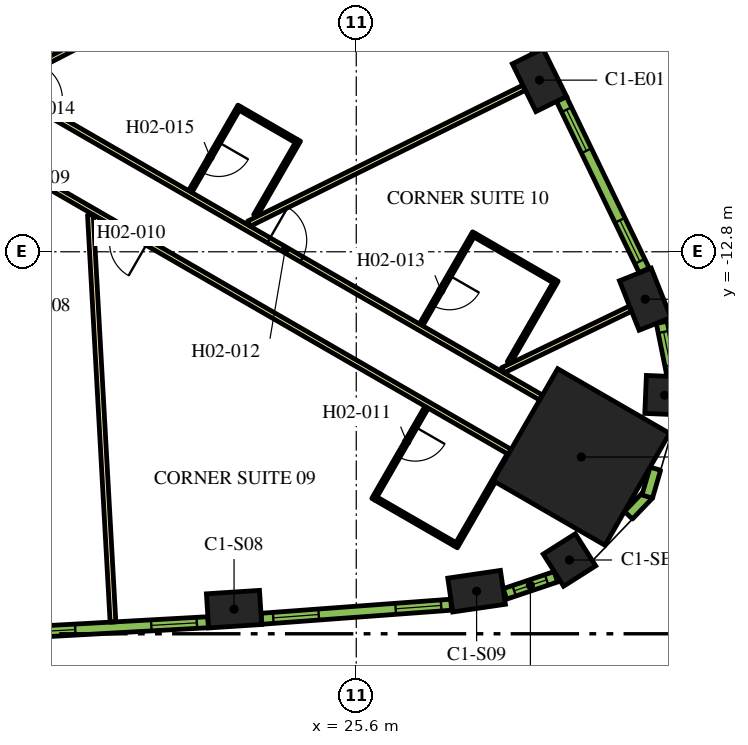
"""IFC4 building model, lengths in metres.
Left out: names, types, materials, properties, quantities, classifications, styles, units other than length and angle.
Written with IfcOpenShell. Run it as: python <this file> out.ifc"""

import sys

from ifc_helpers import new_model, si_unit, direction, frame, frame_2d, origin, origin_2d, place, context, subcontext, project, spatial, rectangle, extrude, element, fill, save


model = new_model("IFC4")
c1 = context("Model", 3, precision=1e-05, world=origin(), true_north=direction((0.0, 1.0)))
c2 = subcontext(c1, "Body", "Model", "MODEL_VIEW")
j1 = project(units=[si_unit("LENGTHUNIT", "METRE"), si_unit("PLANEANGLEUNIT", "RADIAN")], contexts=[c1])
p1 = place(None, origin())
s1 = spatial("IfcSite", under=j1, at=p1, CompositionType="ELEMENT")
p2 = place(p1, origin())
s2 = spatial("IfcBuilding", under=s1, at=p2, CompositionType="ELEMENT")
p3 = place(p2, frame((0.0, 0.0, 43.2)))
s3 = spatial("IfcBuildingStorey", under=s2, at=p3, CompositionType="ELEMENT", Elevation=43.2)
p4 = place(p3, frame((31.522, -18.199, 0.0), z_axis=(0.0, 0.0, 1.0), x_axis=(0.866025403784, -0.5, 0.0)))
e1 = element("IfcColumn", 1, at=p4, inside=s3, PredefinedType="COLUMN", context=c2, shape_type="SweptSolid", body=[
    extrude(rectangle(XDim=3.4, YDim=3.4, at=origin_2d()), origin(), (0.0, 0.0, 1.0), 3.9),
])
for number, where, z_axis, x_axis in (
    (2, (22.385, -22.204, 0.0), (0.0, 0.0, 1.0), (0.998, 0.065, 0.0)),
    (3, (28.767, -21.731, 0.0), (0.0, 0.0, 1.0), (0.989, 0.145, 0.0)),
):
    element("IfcColumn", number, at=place(p3, frame(where, z_axis=z_axis, x_axis=x_axis)), inside=s3, PredefinedType="COLUMN", context=c2, shape_type="SweptSolid", body=[
        extrude(rectangle(XDim=1.4, YDim=0.9, at=origin_2d()), origin(), (0.0, 0.0, 1.0), 3.9),
    ])
for number, where, z_axis, x_axis in (
    (4, (31.21, -20.91, 0.0), (0.0, 0.0, 1.0), (0.844, 0.536, 0.0)),
    (5, (33.713, -16.574, 0.0), (0.0, 0.0, 1.0), (0.042, 0.999, 0.0)),
):
    element("IfcColumn", number, at=place(p3, frame(where, z_axis=z_axis, x_axis=x_axis)), inside=s3, PredefinedType="COLUMN", context=c2, shape_type="SweptSolid", body=[
        extrude(rectangle(XDim=1.0, YDim=1.0, at=origin_2d()), origin(), (0.0, 0.0, 1.0), 3.9),
    ])
for number, where, z_axis, x_axis in (
    (6, (33.203, -14.047, 0.0), (0.0, 0.0, 1.0), (-0.369, 0.929, 0.0)),
    (7, (30.421, -8.284, 0.0), (0.0, 0.0, 1.0), (-0.443, 0.897, 0.0)),
):
    element("IfcColumn", number, at=place(p3, frame(where, z_axis=z_axis, x_axis=x_axis)), inside=s3, PredefinedType="COLUMN", context=c2, shape_type="SweptSolid", body=[
        extrude(rectangle(XDim=1.4, YDim=0.9, at=origin_2d()), origin(), (0.0, 0.0, 1.0), 3.9),
    ])
p5 = place(p3, frame((16.412, -8.523, 0.0), z_axis=(0.0, 0.0, 1.0), x_axis=(0.866022197818, -0.500005552856, 0.0)))
e8 = element("IfcWall", 8, at=p5, inside=s3, PredefinedType="PARTITIONING", context=c2, shape_type="SweptSolid", body=[
    extrude(rectangle(XDim=16.224, YDim=0.15, at=frame_2d((8.112, 0.0))), origin(), (0.0, 0.0, 1.0), 2.75),
])
p6 = place(p5, frame((7.949, 0.0, 0.0)))
e9 = element("IfcOpeningElement", 9, at=p6, cuts=e8, PredefinedType="OPENING", context=c2, shape_type="SweptSolid", body=[
    extrude(rectangle(XDim=1.0, YDim=2.1, at=frame_2d((0.5, 1.05))), frame((0.0, 0.085, 0.0), z_axis=(0.0, -1.0, 0.0), x_axis=(1.0, 0.0, 0.0)), (0.0, 0.0, 1.0), 0.17),
])
p7 = place(p5, frame((0.526, 0.0, 0.0)))
e10 = element("IfcOpeningElement", 10, at=p7, cuts=e8, PredefinedType="OPENING", context=c2, shape_type="SweptSolid", body=[
    extrude(rectangle(XDim=1.0, YDim=2.1, at=frame_2d((0.5, 1.05))), frame((0.0, 0.085, 0.0), z_axis=(0.0, -1.0, 0.0), x_axis=(1.0, 0.0, 0.0)), (0.0, 0.0, 1.0), 0.17),
])
p8 = place(p3, frame((19.081, -3.9, 0.0), z_axis=(0.0, 0.0, 1.0), x_axis=(-0.499974327079, -0.866040225545, 0.0)))
e11 = element("IfcWall", 11, at=p8, inside=s3, PredefinedType="PARTITIONING", context=c2, shape_type="SweptSolid", body=[
    extrude(rectangle(XDim=5.258, YDim=0.15, at=frame_2d((2.629, 0.0))), origin(), (0.0, 0.0, 1.0), 2.75),
])
p9 = place(p3, frame((29.638, -18.064, 0.0), z_axis=(0.0, 0.0, 1.0), x_axis=(-0.866026175601, 0.499998663172, 0.0)))
e12 = element("IfcWall", 12, at=p9, inside=s3, PredefinedType="PARTITIONING", context=c2, shape_type="SweptSolid", body=[
    extrude(rectangle(XDim=16.144, YDim=0.15, at=frame_2d((8.072, 0.0))), origin(), (0.0, 0.0, 1.0), 2.75),
])
p10 = place(p9, frame((13.948, 0.0, 0.0)))
e13 = element("IfcOpeningElement", 13, at=p10, cuts=e12, PredefinedType="OPENING", context=c2, shape_type="SweptSolid", body=[
    extrude(rectangle(XDim=0.9, YDim=2.1, at=frame_2d((0.45, 1.05))), frame((0.0, 0.085, 0.0), z_axis=(0.0, -1.0, 0.0), x_axis=(1.0, 0.0, 0.0)), (0.0, 0.0, 1.0), 0.17),
])
p11 = place(p9, frame((11.004, 0.0, 0.0)))
e14 = element("IfcOpeningElement", 14, at=p11, cuts=e12, PredefinedType="OPENING", context=c2, shape_type="SweptSolid", body=[
    extrude(rectangle(XDim=1.0, YDim=2.1, at=frame_2d((0.5, 1.05))), frame((0.0, 0.085, 0.0), z_axis=(0.0, -1.0, 0.0), x_axis=(1.0, 0.0, 0.0)), (0.0, 0.0, 1.0), 0.17),
])
p12 = place(p3, frame((27.134, -2.779, 0.0), z_axis=(0.0, 0.0, 1.0), x_axis=(-0.8882049501, -0.459447457951, 0.0)))
e15 = element("IfcWall", 15, at=p12, inside=s3, PredefinedType="PARTITIONING", context=c2, shape_type="SweptSolid", body=[
    extrude(rectangle(XDim=11.638, YDim=0.15, at=frame_2d((5.819, 0.0))), origin(), (0.0, 0.0, 1.0), 2.75),
])
p13 = place(p3, frame((19.198, -22.541, 0.0), z_axis=(0.0, 0.0, 1.0), x_axis=(-0.055432210572, 0.99846245299, 0.0)))
e16 = element("IfcWall", 16, at=p13, inside=s3, PredefinedType="PARTITIONING", context=c2, shape_type="SweptSolid", body=[
    extrude(rectangle(XDim=10.729, YDim=0.15, at=frame_2d((5.365, 0.0))), origin(), (0.0, 0.0, 1.0), 2.75),
])
p14 = place(p3, frame((30.018, -8.483, 0.0), z_axis=(0.0, 0.0, 1.0), x_axis=(-0.896544505264, -0.44295366584, 0.0)))
e17 = element("IfcWall", 17, at=p14, inside=s3, PredefinedType="PARTITIONING", context=c2, shape_type="SweptSolid", body=[
    extrude(rectangle(XDim=8.079, YDim=0.15, at=frame_2d((4.04, 0.0))), origin(), (0.0, 0.0, 1.0), 2.75),
])
p15 = place(p3, frame((32.817, -14.296, 0.0), z_axis=(0.0, 0.0, 1.0), x_axis=(-0.900616957918, -0.434613730927, 0.0)))
e18 = element("IfcWall", 18, at=p15, inside=s3, PredefinedType="PARTITIONING", context=c2, shape_type="SweptSolid", body=[
    extrude(rectangle(XDim=3.733, YDim=0.15, at=frame_2d((1.867, 0.0))), origin(), (0.0, 0.0, 1.0), 2.75),
])
p16 = place(p3, frame((27.452, -16.889, 0.0), z_axis=(0.0, 0.0, 1.0), x_axis=(-0.49998411664, -0.866034573852, 0.0)))
e19 = element("IfcWall", 19, at=p16, inside=s3, PredefinedType="PARTITIONING", context=c2, shape_type="SweptSolid", body=[
    extrude(rectangle(XDim=2.8, YDim=0.1, at=frame_2d((1.4, 0.0))), origin(), (0.0, 0.0, 1.0), 2.75),
])
p17 = place(p16, frame((0.6, 0.0, 0.0)))
e20 = element("IfcOpeningElement", 20, at=p17, cuts=e19, PredefinedType="OPENING", context=c2, shape_type="SweptSolid", body=[
    extrude(rectangle(XDim=0.9, YDim=2.1, at=frame_2d((0.45, 1.05))), frame((0.0, 0.06, 0.0), z_axis=(0.0, -1.0, 0.0), x_axis=(1.0, 0.0, 0.0)), (0.0, 0.0, 1.0), 0.12),
])
p18 = place(p3, frame((26.121, -19.295, 0.0), z_axis=(0.0, 0.0, 1.0), x_axis=(0.866006032174, -0.500033551112, 0.0)))
e21 = element("IfcWall", 21, at=p18, inside=s3, PredefinedType="PARTITIONING", context=c2, shape_type="SweptSolid", body=[
    extrude(rectangle(XDim=2.4, YDim=0.1, at=frame_2d((1.2, 0.0))), origin(), (0.0, 0.0, 1.0), 2.75),
])
p19 = place(p3, frame((29.617, -18.139, 0.0), z_axis=(0.0, 0.0, 1.0), x_axis=(-0.49998411664, -0.866034573852, 0.0)))
e22 = element("IfcWall", 22, at=p19, inside=s3, PredefinedType="PARTITIONING", context=c2, shape_type="SweptSolid", body=[
    extrude(rectangle(XDim=2.8, YDim=0.1, at=frame_2d((1.4, 0.0))), origin(), (0.0, 0.0, 1.0), 2.75),
])
p20 = place(p3, frame((28.704, -12.3, 0.0), z_axis=(0.0, 0.0, 1.0), x_axis=(-0.49998411664, -0.866034573852, 0.0)))
e23 = element("IfcWall", 23, at=p20, inside=s3, PredefinedType="PARTITIONING", context=c2, shape_type="SweptSolid", body=[
    extrude(rectangle(XDim=2.8, YDim=0.1, at=frame_2d((1.4, 0.0))), origin(), (0.0, 0.0, 1.0), 2.75),
])
p21 = place(p20, frame((1.3, 0.0, 0.0)))
e24 = element("IfcOpeningElement", 24, at=p21, cuts=e23, PredefinedType="OPENING", context=c2, shape_type="SweptSolid", body=[
    extrude(rectangle(XDim=0.9, YDim=2.1, at=frame_2d((0.45, 1.05))), frame((0.0, 0.06, 0.0), z_axis=(0.0, -1.0, 0.0), x_axis=(1.0, 0.0, 0.0)), (0.0, 0.0, 1.0), 0.12),
])
p22 = place(p3, frame((28.722, -12.368, 0.0), z_axis=(0.0, 0.0, 1.0), x_axis=(0.866050077142, -0.499957262057, 0.0)))
e25 = element("IfcWall", 25, at=p22, inside=s3, PredefinedType="PARTITIONING", context=c2, shape_type="SweptSolid", body=[
    extrude(rectangle(XDim=2.4, YDim=0.1, at=frame_2d((1.2, 0.0))), origin(), (0.0, 0.0, 1.0), 2.75),
])
p23 = place(p3, frame((29.619, -15.715, 0.0), z_axis=(0.0, 0.0, 1.0), x_axis=(0.500004234368, 0.866022959057, 0.0)))
e26 = element("IfcWall", 26, at=p23, inside=s3, PredefinedType="PARTITIONING", context=c2, shape_type="SweptSolid", body=[
    extrude(rectangle(XDim=2.5, YDim=0.1, at=frame_2d((1.25, 0.0))), origin(), (0.0, 0.0, 1.0), 2.75),
])
p24 = place(p3, frame((22.53, -8.966, 0.0), z_axis=(0.0, 0.0, 1.0), x_axis=(-0.500006934395, -0.866021400173, 0.0)))
e27 = element("IfcWall", 27, at=p24, inside=s3, PredefinedType="PARTITIONING", context=c2, shape_type="SweptSolid", body=[
    extrude(rectangle(XDim=2.6, YDim=0.1, at=frame_2d((1.3, 0.0))), origin(), (0.0, 0.0, 1.0), 2.75),
])
p25 = place(p24, frame((1.1, 0.0, 0.0)))
e28 = element("IfcOpeningElement", 28, at=p25, cuts=e27, PredefinedType="OPENING", context=c2, shape_type="SweptSolid", body=[
    extrude(rectangle(XDim=0.9, YDim=2.1, at=frame_2d((0.45, 1.05))), frame((0.0, 0.06, 0.0), z_axis=(0.0, -1.0, 0.0), x_axis=(1.0, 0.0, 0.0)), (0.0, 0.0, 1.0), 0.12),
])
p26 = place(p3, frame((22.549, -9.035, 0.0), z_axis=(0.0, 0.0, 1.0), x_axis=(0.86605165483, -0.499954529098, 0.0)))
e29 = element("IfcWall", 29, at=p26, inside=s3, PredefinedType="PARTITIONING", context=c2, shape_type="SweptSolid", body=[
    extrude(rectangle(XDim=1.7, YDim=0.1, at=frame_2d((0.85, 0.0))), origin(), (0.0, 0.0, 1.0), 2.75),
])
p27 = place(p3, frame((22.944, -11.85, 0.0), z_axis=(0.0, 0.0, 1.0), x_axis=(0.499968531483, 0.866043571379, 0.0)))
e30 = element("IfcWall", 30, at=p27, inside=s3, PredefinedType="PARTITIONING", context=c2, shape_type="SweptSolid", body=[
    extrude(rectangle(XDim=2.29, YDim=0.1, at=frame_2d((1.145, 0.0))), origin(), (0.0, 0.0, 1.0), 2.75),
])
p28 = place(p3, frame((16.711, -22.824, 0.0), z_axis=(0.0, 0.0, 1.0), x_axis=(0.998464708705, 0.055391564976, 0.0)))
e31 = element("IfcWall", 31, at=p28, inside=s3, PredefinedType="SOLIDWALL", context=c2, shape_type="SweptSolid", body=[
    extrude(rectangle(XDim=4.998, YDim=0.29, at=frame_2d((2.499, 0.0))), origin(), (0.0, 0.0, 1.0), 3.65),
])
p29 = place(p28, frame((0.297, 0.0, 0.9)))
e32 = element("IfcOpeningElement", 32, at=p29, cuts=e31, PredefinedType="OPENING", context=c2, shape_type="SweptSolid", body=[
    extrude(rectangle(XDim=1.2, YDim=2.15, at=frame_2d((0.6, 1.075))), frame((0.0, 0.155, 0.0), z_axis=(0.0, -1.0, 0.0), x_axis=(1.0, 0.0, 0.0)), (0.0, 0.0, 1.0), 0.31),
])
p30 = place(p28, frame((3.501, 0.0, 0.9)))
e33 = element("IfcOpeningElement", 33, at=p30, cuts=e31, PredefinedType="OPENING", context=c2, shape_type="SweptSolid", body=[
    extrude(rectangle(XDim=1.2, YDim=2.15, at=frame_2d((0.6, 1.075))), frame((0.0, 0.155, 0.0), z_axis=(0.0, -1.0, 0.0), x_axis=(1.0, 0.0, 0.0)), (0.0, 0.0, 1.0), 0.31),
])
p31 = place(p3, frame((23.106, -22.456, 0.0), z_axis=(0.0, 0.0, 1.0), x_axis=(0.997266290399, 0.073891447643, 0.0)))
e34 = element("IfcWall", 34, at=p31, inside=s3, PredefinedType="SOLIDWALL", context=c2, shape_type="SweptSolid", body=[
    extrude(rectangle(XDim=5.006, YDim=0.29, at=frame_2d((2.503, 0.0))), origin(), (0.0, 0.0, 1.0), 3.65),
])
p32 = place(p31, frame((0.31, 0.0, 0.9)))
e35 = element("IfcOpeningElement", 35, at=p32, cuts=e34, PredefinedType="OPENING", context=c2, shape_type="SweptSolid", body=[
    extrude(rectangle(XDim=1.2, YDim=2.15, at=frame_2d((0.6, 1.075))), frame((0.0, 0.155, 0.0), z_axis=(0.0, -1.0, 0.0), x_axis=(1.0, 0.0, 0.0)), (0.0, 0.0, 1.0), 0.31),
])
p33 = place(p31, frame((3.54, 0.0, 0.9)))
e36 = element("IfcOpeningElement", 36, at=p33, cuts=e34, PredefinedType="OPENING", context=c2, shape_type="SweptSolid", body=[
    extrude(rectangle(XDim=1.2, YDim=2.15, at=frame_2d((0.6, 1.075))), frame((0.0, 0.155, 0.0), z_axis=(0.0, -1.0, 0.0), x_axis=(1.0, 0.0, 0.0)), (0.0, 0.0, 1.0), 0.31),
])
p34 = place(p3, frame((29.512, -21.802, 0.0), z_axis=(0.0, 0.0, 1.0), x_axis=(0.947903891592, 0.318556450734, 0.0)))
e37 = element("IfcWall", 37, at=p34, inside=s3, PredefinedType="SOLIDWALL", context=c2, shape_type="SweptSolid", body=[
    extrude(rectangle(XDim=1.415, YDim=0.29, at=frame_2d((0.708, 0.0))), origin(), (0.0, 0.0, 1.0), 3.65),
])
p35 = place(p34, frame((0.257, 0.0, 0.9)))
e38 = element("IfcOpeningElement", 38, at=p35, cuts=e37, PredefinedType="OPENING", context=c2, shape_type="SweptSolid", body=[
    extrude(rectangle(XDim=0.9, YDim=2.15, at=frame_2d((0.45, 1.075))), frame((0.0, 0.155, 0.0), z_axis=(0.0, -1.0, 0.0), x_axis=(1.0, 0.0, 0.0)), (0.0, 0.0, 1.0), 0.31),
])
for number, where, z_axis, x_axis in (
    (39, (32.762, -19.732, 0.0), (0.0, 0.0, 1.0), (0.692, 0.722, 0.0)),
    (40, (33.257, -19.241, 0.0), (0.0, 0.0, 1.0), (0.279, 0.96, 0.0)),
):
    element("IfcWall", number, at=place(p3, frame(where, z_axis=z_axis, x_axis=x_axis)), inside=s3, PredefinedType="SOLIDWALL", context=c2, shape_type="SweptSolid", body=[
        extrude(rectangle(XDim=0.764, YDim=0.29, at=frame_2d((0.382, 0.0))), origin(), (0.0, 0.0, 1.0), 3.65),
    ])
p36 = place(p3, frame((33.917, -16.044, 0.0), z_axis=(0.0, 0.0, 1.0), x_axis=(-0.198106888228, 0.980180422594, 0.0)))
e41 = element("IfcWall", 41, at=p36, inside=s3, PredefinedType="SOLIDWALL", context=c2, shape_type="SweptSolid", body=[
    extrude(rectangle(XDim=1.415, YDim=0.29, at=frame_2d((0.708, 0.0))), origin(), (0.0, 0.0, 1.0), 3.65),
])
p37 = place(p36, frame((0.257, 0.0, 0.9)))
e42 = element("IfcOpeningElement", 42, at=p37, cuts=e41, PredefinedType="OPENING", context=c2, shape_type="SweptSolid", body=[
    extrude(rectangle(XDim=0.9, YDim=2.15, at=frame_2d((0.45, 1.075))), frame((0.0, 0.155, 0.0), z_axis=(0.0, -1.0, 0.0), x_axis=(1.0, 0.0, 0.0)), (0.0, 0.0, 1.0), 0.31),
])
p38 = place(p3, frame((33.176, -13.29, 0.0), z_axis=(0.0, 0.0, 1.0), x_axis=(-0.434664499056, 0.900592456808, 0.0)))
e43 = element("IfcWall", 43, at=p38, inside=s3, PredefinedType="SOLIDWALL", context=c2, shape_type="SweptSolid", body=[
    extrude(rectangle(XDim=5.006, YDim=0.29, at=frame_2d((2.503, 0.0))), origin(), (0.0, 0.0, 1.0), 3.65),
])
p39 = place(p38, frame((0.265, 0.0, 0.9)))
e44 = element("IfcOpeningElement", 44, at=p39, cuts=e43, PredefinedType="OPENING", context=c2, shape_type="SweptSolid", body=[
    extrude(rectangle(XDim=1.2, YDim=2.15, at=frame_2d((0.6, 1.075))), frame((0.0, 0.155, 0.0), z_axis=(0.0, -1.0, 0.0), x_axis=(1.0, 0.0, 0.0)), (0.0, 0.0, 1.0), 0.31),
])
p40 = place(p38, frame((3.496, 0.0, 0.9)))
e45 = element("IfcOpeningElement", 45, at=p40, cuts=e43, PredefinedType="OPENING", context=c2, shape_type="SweptSolid", body=[
    extrude(rectangle(XDim=1.2, YDim=2.15, at=frame_2d((0.6, 1.075))), frame((0.0, 0.155, 0.0), z_axis=(0.0, -1.0, 0.0), x_axis=(1.0, 0.0, 0.0)), (0.0, 0.0, 1.0), 0.31),
])
p41 = place(p3, frame((30.377, -7.521, 0.0), z_axis=(0.0, 0.0, 1.0), x_axis=(-0.451233929645, 0.892405704115, 0.0)))
e46 = element("IfcWall", 46, at=p41, inside=s3, PredefinedType="SOLIDWALL", context=c2, shape_type="SweptSolid", body=[
    extrude(rectangle(XDim=4.998, YDim=0.29, at=frame_2d((2.499, 0.0))), origin(), (0.0, 0.0, 1.0), 3.65),
])
p42 = place(p41, frame((0.297, 0.0, 0.9)))
e47 = element("IfcOpeningElement", 47, at=p42, cuts=e46, PredefinedType="OPENING", context=c2, shape_type="SweptSolid", body=[
    extrude(rectangle(XDim=1.2, YDim=2.15, at=frame_2d((0.6, 1.075))), frame((0.0, 0.155, 0.0), z_axis=(0.0, -1.0, 0.0), x_axis=(1.0, 0.0, 0.0)), (0.0, 0.0, 1.0), 0.31),
])
p43 = place(p41, frame((3.501, 0.0, 0.9)))
e48 = element("IfcOpeningElement", 48, at=p43, cuts=e46, PredefinedType="OPENING", context=c2, shape_type="SweptSolid", body=[
    extrude(rectangle(XDim=1.2, YDim=2.15, at=frame_2d((0.6, 1.075))), frame((0.0, 0.155, 0.0), z_axis=(0.0, -1.0, 0.0), x_axis=(1.0, 0.0, 0.0)), (0.0, 0.0, 1.0), 0.31),
])
p44 = place(p11, origin())
e49 = element("IfcDoor", 49, at=p44, inside=s3, OperationType="SINGLE_SWING_RIGHT", PredefinedType="DOOR", context=c2, shape_type="SweptSolid", body=[
    extrude(rectangle(XDim=1.0, YDim=2.1, at=frame_2d((0.5, 1.05))), frame((0.0, 0.025, 0.0), z_axis=(0.0, -1.0, 0.0), x_axis=(1.0, 0.0, 0.0)), (0.0, 0.0, 1.0), 0.05),
])
fill(e14, e49)
p45 = place(p17, origin())
e50 = element("IfcDoor", 50, at=p45, inside=s3, OperationType="SINGLE_SWING_RIGHT", PredefinedType="DOOR", context=c2, shape_type="SweptSolid", body=[
    extrude(rectangle(XDim=0.9, YDim=2.1, at=frame_2d((0.45, 1.05))), frame((0.0, 0.025, 0.0), z_axis=(0.0, -1.0, 0.0), x_axis=(1.0, 0.0, 0.0)), (0.0, 0.0, 1.0), 0.05),
])
fill(e20, e50)
p46 = place(p6, origin())
e51 = element("IfcDoor", 51, at=p46, inside=s3, OperationType="SINGLE_SWING_LEFT", PredefinedType="DOOR", context=c2, shape_type="SweptSolid", body=[
    extrude(rectangle(XDim=1.0, YDim=2.1, at=frame_2d((0.5, 1.05))), frame((0.0, 0.025, 0.0), z_axis=(0.0, -1.0, 0.0), x_axis=(1.0, 0.0, 0.0)), (0.0, 0.0, 1.0), 0.05),
])
fill(e9, e51)
p47 = place(p21, origin())
e52 = element("IfcDoor", 52, at=p47, inside=s3, OperationType="SINGLE_SWING_LEFT", PredefinedType="DOOR", context=c2, shape_type="SweptSolid", body=[
    extrude(rectangle(XDim=0.9, YDim=2.1, at=frame_2d((0.45, 1.05))), frame((0.0, 0.025, 0.0), z_axis=(0.0, -1.0, 0.0), x_axis=(1.0, 0.0, 0.0)), (0.0, 0.0, 1.0), 0.05),
])
fill(e24, e52)
p48 = place(p7, origin())
e53 = element("IfcDoor", 53, at=p48, inside=s3, OperationType="SINGLE_SWING_LEFT", PredefinedType="DOOR", context=c2, shape_type="SweptSolid", body=[
    extrude(rectangle(XDim=1.0, YDim=2.1, at=frame_2d((0.5, 1.05))), frame((0.0, 0.025, 0.0), z_axis=(0.0, -1.0, 0.0), x_axis=(1.0, 0.0, 0.0)), (0.0, 0.0, 1.0), 0.05),
])
fill(e10, e53)
p49 = place(p25, origin())
e54 = element("IfcDoor", 54, at=p49, inside=s3, OperationType="SINGLE_SWING_LEFT", PredefinedType="DOOR", context=c2, shape_type="SweptSolid", body=[
    extrude(rectangle(XDim=0.9, YDim=2.1, at=frame_2d((0.45, 1.05))), frame((0.0, 0.025, 0.0), z_axis=(0.0, -1.0, 0.0), x_axis=(1.0, 0.0, 0.0)), (0.0, 0.0, 1.0), 0.05),
])
fill(e28, e54)
p50 = place(p29, origin())
e55 = element("IfcWindow", 55, at=p50, inside=s3, PartitioningType="DOUBLE_PANEL_VERTICAL", PredefinedType="WINDOW", context=c2, shape_type="SweptSolid", body=[
    extrude(rectangle(XDim=1.2, YDim=2.15, at=frame_2d((0.6, 1.075))), frame((0.0, 0.015, 0.0), z_axis=(0.0, -1.0, 0.0), x_axis=(1.0, 0.0, 0.0)), (0.0, 0.0, 1.0), 0.06),
])
fill(e32, e55)
p51 = place(p30, origin())
e56 = element("IfcWindow", 56, at=p51, inside=s3, PartitioningType="DOUBLE_PANEL_VERTICAL", PredefinedType="WINDOW", context=c2, shape_type="SweptSolid", body=[
    extrude(rectangle(XDim=1.2, YDim=2.15, at=frame_2d((0.6, 1.075))), frame((0.0, 0.015, 0.0), z_axis=(0.0, -1.0, 0.0), x_axis=(1.0, 0.0, 0.0)), (0.0, 0.0, 1.0), 0.06),
])
fill(e33, e56)
p52 = place(p32, origin())
e57 = element("IfcWindow", 57, at=p52, inside=s3, PartitioningType="DOUBLE_PANEL_VERTICAL", PredefinedType="WINDOW", context=c2, shape_type="SweptSolid", body=[
    extrude(rectangle(XDim=1.2, YDim=2.15, at=frame_2d((0.6, 1.075))), frame((0.0, 0.015, 0.0), z_axis=(0.0, -1.0, 0.0), x_axis=(1.0, 0.0, 0.0)), (0.0, 0.0, 1.0), 0.06),
])
fill(e35, e57)
p53 = place(p33, origin())
e58 = element("IfcWindow", 58, at=p53, inside=s3, PartitioningType="DOUBLE_PANEL_VERTICAL", PredefinedType="WINDOW", context=c2, shape_type="SweptSolid", body=[
    extrude(rectangle(XDim=1.2, YDim=2.15, at=frame_2d((0.6, 1.075))), frame((0.0, 0.015, 0.0), z_axis=(0.0, -1.0, 0.0), x_axis=(1.0, 0.0, 0.0)), (0.0, 0.0, 1.0), 0.06),
])
fill(e36, e58)
p54 = place(p35, origin())
e59 = element("IfcWindow", 59, at=p54, inside=s3, PartitioningType="SINGLE_PANEL", PredefinedType="WINDOW", context=c2, shape_type="SweptSolid", body=[
    extrude(rectangle(XDim=0.9, YDim=2.15, at=frame_2d((0.45, 1.075))), frame((0.0, 0.015, 0.0), z_axis=(0.0, -1.0, 0.0), x_axis=(1.0, 0.0, 0.0)), (0.0, 0.0, 1.0), 0.06),
])
fill(e38, e59)
p55 = place(p37, origin())
e60 = element("IfcWindow", 60, at=p55, inside=s3, PartitioningType="SINGLE_PANEL", PredefinedType="WINDOW", context=c2, shape_type="SweptSolid", body=[
    extrude(rectangle(XDim=0.9, YDim=2.15, at=frame_2d((0.45, 1.075))), frame((0.0, 0.015, 0.0), z_axis=(0.0, -1.0, 0.0), x_axis=(1.0, 0.0, 0.0)), (0.0, 0.0, 1.0), 0.06),
])
fill(e42, e60)
p56 = place(p39, origin())
e61 = element("IfcWindow", 61, at=p56, inside=s3, PartitioningType="DOUBLE_PANEL_VERTICAL", PredefinedType="WINDOW", context=c2, shape_type="SweptSolid", body=[
    extrude(rectangle(XDim=1.2, YDim=2.15, at=frame_2d((0.6, 1.075))), frame((0.0, 0.015, 0.0), z_axis=(0.0, -1.0, 0.0), x_axis=(1.0, 0.0, 0.0)), (0.0, 0.0, 1.0), 0.06),
])
fill(e44, e61)
p57 = place(p40, origin())
e62 = element("IfcWindow", 62, at=p57, inside=s3, PartitioningType="DOUBLE_PANEL_VERTICAL", PredefinedType="WINDOW", context=c2, shape_type="SweptSolid", body=[
    extrude(rectangle(XDim=1.2, YDim=2.15, at=frame_2d((0.6, 1.075))), frame((0.0, 0.015, 0.0), z_axis=(0.0, -1.0, 0.0), x_axis=(1.0, 0.0, 0.0)), (0.0, 0.0, 1.0), 0.06),
])
fill(e45, e62)
save(model, sys.argv[1])
